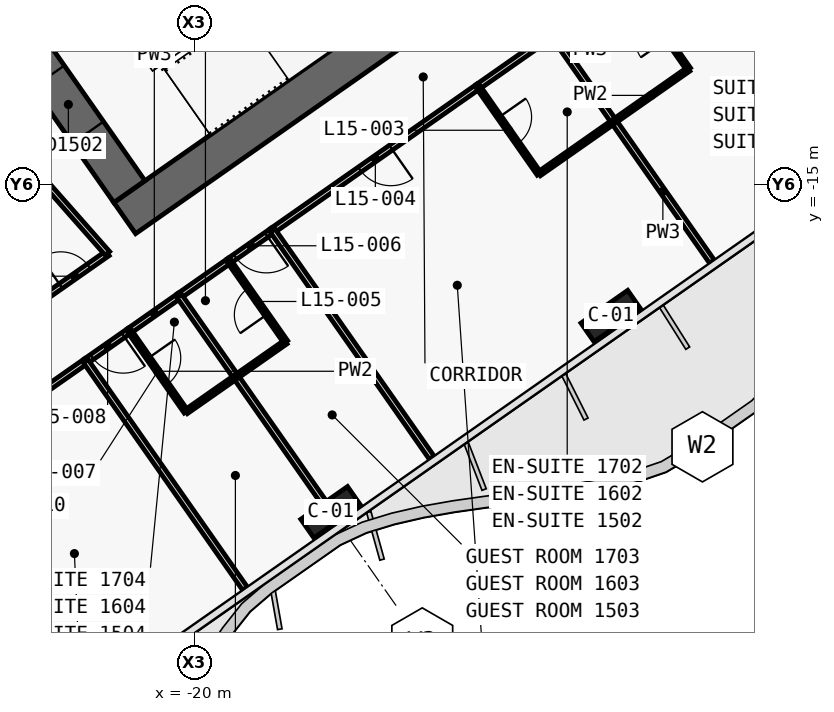
"""IFC4 building model, lengths in metres.
Left out: names, types, materials, properties, quantities, classifications, styles, units other than length and angle.
Written with IfcOpenShell. Run it as: python <this file> out.ifc"""

import sys

from ifc_helpers import new_model, si_unit, direction, frame, frame_2d, origin, origin_2d, place, context, subcontext, project, spatial, polyline, rectangle, outline, extrude, element, fill, save


model = new_model("IFC4")
c1 = context("Model", 3, precision=1e-05, world=origin(), true_north=direction((0.0, 1.0)))
c2 = subcontext(c1, "Body", "Model", "MODEL_VIEW")
j1 = project(units=[si_unit("LENGTHUNIT", "METRE"), si_unit("PLANEANGLEUNIT", "RADIAN")], contexts=[c1])
p1 = place(None, origin())
s1 = spatial("IfcSite", under=j1, at=p1, CompositionType="ELEMENT")
p2 = place(p1, origin())
s2 = spatial("IfcBuilding", under=s1, at=p2, CompositionType="ELEMENT")
p3 = place(p2, frame((0.0, 0.0, 79.7)))
s3 = spatial("IfcBuildingStorey", under=s2, at=p3, CompositionType="ELEMENT", Elevation=79.7)
p4 = place(p3, frame((0.037, -0.585, 0.0), z_axis=(0.0, 0.0, 1.0), x_axis=(-0.819157152511, -0.573569140985, 0.0)))
e1 = element("IfcWall", 1, at=p4, inside=s3, PredefinedType="SHEAR", context=c2, shape_type="SweptSolid", body=[
    extrude(outline(polyline([(26.695, 0.5), (0.7, 0.5), (0.0, -0.5), (26.695, -0.5), (26.695, 0.5)])), origin(), (0.0, 0.0, 1.0), 3.6),
])
p5 = place(p4, frame((2.995, 0.0, 0.0)))
e2 = element("IfcOpeningElement", 2, at=p5, cuts=e1, PredefinedType="OPENING", context=c2, shape_type="SweptSolid", body=[
    extrude(rectangle(XDim=2.4, YDim=2.1, at=frame_2d((1.2, 1.05))), frame((0.0, 0.51, 0.0), z_axis=(0.0, -1.0, 0.0), x_axis=(1.0, 0.0, 0.0)), (0.0, 0.0, 1.0), 1.02),
])
p6 = place(p4, frame((11.995, 0.0, 0.0)))
e3 = element("IfcOpeningElement", 3, at=p6, cuts=e1, PredefinedType="OPENING", context=c2, shape_type="SweptSolid", body=[
    extrude(rectangle(XDim=2.4, YDim=2.1, at=frame_2d((1.2, 1.05))), frame((0.0, 0.51, 0.0), z_axis=(0.0, -1.0, 0.0), x_axis=(1.0, 0.0, 0.0)), (0.0, 0.0, 1.0), 1.02),
])
p7 = place(p3, frame((-21.708, -15.2, 0.0), z_axis=(0.0, 0.0, 1.0), x_axis=(-0.573576324356, 0.819152122709, 0.0)))
e4 = element("IfcWall", 4, at=p7, inside=s3, PredefinedType="SHEAR", context=c2, shape_type="SweptSolid", body=[
    extrude(outline(polyline([(0.0, 0.5), (0.0, -0.5), (9.2, -0.5), (9.2, 0.5), (0.0, 0.5)])), origin(), (0.0, 0.0, 1.0), 3.6),
])
p8 = place(p7, frame((6.1, 0.0, 0.0)))
e5 = element("IfcOpeningElement", 5, at=p8, cuts=e4, PredefinedType="OPENING", context=c2, shape_type="SweptSolid", body=[
    extrude(rectangle(XDim=1.8, YDim=2.1, at=frame_2d((0.9, 1.05))), frame((0.0, 0.51, 0.0), z_axis=(0.0, -1.0, 0.0), x_axis=(1.0, 0.0, 0.0)), (0.0, 0.0, 1.0), 1.02),
])
p9 = place(p7, frame((1.9, 0.0, 0.0)))
e6 = element("IfcOpeningElement", 6, at=p9, cuts=e4, PredefinedType="OPENING", context=c2, shape_type="SweptSolid", body=[
    extrude(rectangle(XDim=1.8, YDim=2.1, at=frame_2d((0.9, 1.05))), frame((0.0, 0.51, 0.0), z_axis=(0.0, -1.0, 0.0), x_axis=(1.0, 0.0, 0.0)), (0.0, 0.0, 1.0), 1.02),
])
for number, where, z_axis, x_axis in (
    (7, (-9.038, -18.475, 0.0), (0.0, 0.0, 1.0), (-0.819, -0.574, 0.0)),
    (8, (-16.41, -23.637, 0.0), (0.0, 0.0, 1.0), (-0.819, -0.574, 0.0)),
):
    element("IfcColumn", number, at=place(p3, frame(where, z_axis=z_axis, x_axis=x_axis)), inside=s3, PredefinedType="COLUMN", context=c2, shape_type="SweptSolid", body=[
        extrude(rectangle(XDim=1.5, YDim=0.6, at=origin_2d()), origin(), (0.0, 0.0, 1.0), 3.6),
    ])
p10 = place(p3, frame((-24.003, -18.028, 0.0), z_axis=(0.0, 0.0, 1.0), x_axis=(0.819160859995, 0.573563846013, 0.0)))
e9 = element("IfcWall", 9, at=p10, inside=s3, PredefinedType="PARTITIONING", context=c2, shape_type="SweptSolid", body=[
    extrude(rectangle(XDim=2.098, YDim=0.15, at=frame_2d((1.049, 0.0))), origin(), (0.0, 0.0, 1.0), 3.32),
])
p11 = place(p10, frame((0.599, 0.0, 0.0)))
e10 = element("IfcOpeningElement", 10, at=p11, cuts=e9, PredefinedType="OPENING", context=c2, shape_type="SweptSolid", body=[
    extrude(rectangle(XDim=0.9, YDim=2.1, at=frame_2d((0.45, 1.05))), frame((0.0, 0.085, 0.0), z_axis=(0.0, -1.0, 0.0), x_axis=(1.0, 0.0, 0.0)), (0.0, 0.0, 1.0), 0.17),
])
p12 = place(p3, frame((-12.532, -12.437, 0.0), z_axis=(0.0, 0.0, 1.0), x_axis=(-0.819153746897, -0.573574004767, 0.0)))
e11 = element("IfcWall", 11, at=p12, inside=s3, PredefinedType="PARTITIONING", context=c2, shape_type="SweptSolid", body=[
    extrude(rectangle(XDim=6.603, YDim=0.15, at=frame_2d((3.302, 0.0))), origin(), (0.0, 0.0, 1.0), 2.6),
])
p13 = place(p12, frame((2.801, 0.0, 0.0)))
e12 = element("IfcOpeningElement", 12, at=p13, cuts=e11, PredefinedType="OPENING", context=c2, shape_type="SweptSolid", body=[
    extrude(rectangle(XDim=1.0, YDim=2.1, at=frame_2d((0.5, 1.05))), frame((0.0, 0.085, 0.0), z_axis=(0.0, -1.0, 0.0), x_axis=(1.0, 0.0, 0.0)), (0.0, 0.0, 1.0), 0.17),
])
p14 = place(p3, frame((-10.565, -11.06, 0.0), z_axis=(0.0, 0.0, 1.0), x_axis=(-0.819193748, -0.57351687267, 0.0)))
e13 = element("IfcWall", 13, at=p14, inside=s3, PredefinedType="PARTITIONING", context=c2, shape_type="SweptSolid", body=[
    extrude(rectangle(XDim=2.404, YDim=0.15, at=frame_2d((1.202, 0.0))), origin(), (0.0, 0.0, 1.0), 3.32),
])
p15 = place(p3, frame((-17.937, -16.222, 0.0), z_axis=(0.0, 0.0, 1.0), x_axis=(-0.819199220913, -0.573509055252, 0.0)))
e14 = element("IfcWall", 14, at=p15, inside=s3, PredefinedType="PARTITIONING", context=c2, shape_type="SweptSolid", body=[
    extrude(rectangle(XDim=1.403, YDim=0.15, at=frame_2d((0.702, 0.0))), origin(), (0.0, 0.0, 1.0), 3.32),
])
p16 = place(p15, frame((0.202, 0.0, 0.0)))
e15 = element("IfcOpeningElement", 15, at=p16, cuts=e14, PredefinedType="OPENING", context=c2, shape_type="SweptSolid", body=[
    extrude(rectangle(XDim=1.0, YDim=2.1, at=frame_2d((0.5, 1.05))), frame((0.0, 0.085, 0.0), z_axis=(0.0, -1.0, 0.0), x_axis=(1.0, 0.0, 0.0)), (0.0, 0.0, 1.0), 0.17),
])
p17 = place(p3, frame((-19.084, -17.025, 0.0), z_axis=(0.0, 0.0, 1.0), x_axis=(-0.819117502046, -0.573625764625, 0.0)))
e16 = element("IfcWall", 16, at=p17, inside=s3, PredefinedType="PARTITIONING", context=c2, shape_type="SweptSolid", body=[
    extrude(rectangle(XDim=1.604, YDim=0.15, at=frame_2d((0.802, 0.0))), origin(), (0.0, 0.0, 1.0), 2.6),
])
p18 = place(p3, frame((-21.706, -18.861, 0.0), z_axis=(0.0, 0.0, 1.0), x_axis=(-0.819060210533, -0.573707566205, 0.0)))
e17 = element("IfcWall", 17, at=p18, inside=s3, PredefinedType="PARTITIONING", context=c2, shape_type="SweptSolid", body=[
    extrude(rectangle(XDim=1.403, YDim=0.15, at=frame_2d((0.702, 0.0))), origin(), (0.0, 0.0, 1.0), 3.32),
])
p19 = place(p18, frame((0.201, 0.0, 0.0)))
e18 = element("IfcOpeningElement", 18, at=p19, cuts=e17, PredefinedType="OPENING", context=c2, shape_type="SweptSolid", body=[
    extrude(rectangle(XDim=1.0, YDim=2.1, at=frame_2d((0.5, 1.05))), frame((0.0, 0.085, 0.0), z_axis=(0.0, -1.0, 0.0), x_axis=(1.0, 0.0, 0.0)), (0.0, 0.0, 1.0), 0.17),
])
p20 = place(p3, frame((-20.395, -17.943, 0.0), z_axis=(0.0, 0.0, 1.0), x_axis=(-0.819189013667, -0.573523634986, 0.0)))
e19 = element("IfcWall", 19, at=p20, inside=s3, PredefinedType="PARTITIONING", context=c2, shape_type="SweptSolid", body=[
    extrude(rectangle(XDim=1.604, YDim=0.15, at=frame_2d((0.802, 0.0))), origin(), (0.0, 0.0, 1.0), 2.6),
])
p21 = place(p3, frame((-22.852, -19.664, 0.0), z_axis=(0.0, 0.0, 1.0), x_axis=(-0.819141582452, -0.573591377113, 0.0)))
e20 = element("IfcWall", 20, at=p21, inside=s3, PredefinedType="PARTITIONING", context=c2, shape_type="SweptSolid", body=[
    extrude(rectangle(XDim=6.603, YDim=0.15, at=frame_2d((3.301, 0.0))), origin(), (0.0, 0.0, 1.0), 2.6),
])
p22 = place(p21, frame((2.802, 0.0, 0.0)))
e21 = element("IfcOpeningElement", 21, at=p22, cuts=e20, PredefinedType="OPENING", context=c2, shape_type="SweptSolid", body=[
    extrude(rectangle(XDim=1.0, YDim=2.1, at=frame_2d((0.5, 1.05))), frame((0.0, 0.085, 0.0), z_axis=(0.0, -1.0, 0.0), x_axis=(1.0, 0.0, 0.0)), (0.0, 0.0, 1.0), 0.17),
])
p23 = place(p3, frame((-1.849, -13.051, 0.0), z_axis=(0.0, 0.0, 1.0), x_axis=(-0.573575988258, 0.819152358047, 0.0)))
e22 = element("IfcWall", 22, at=p23, inside=s3, PredefinedType="PARTITIONING", context=c2, shape_type="SweptSolid", body=[
    extrude(rectangle(XDim=6.632, YDim=0.15, at=frame_2d((3.316, 0.0))), origin(), (0.0, 0.0, 1.0), 2.6),
])
p24 = place(p3, frame((-22.284, -16.827, 0.0), z_axis=(0.0, 0.0, 1.0), x_axis=(-0.661545117561, 0.749905365651, 0.0)))
e23 = element("IfcWall", 23, at=p24, inside=s3, PredefinedType="PARTITIONING", context=c2, shape_type="SweptSolid", body=[
    extrude(rectangle(XDim=6.543, YDim=0.15, at=frame_2d((3.271, 0.0))), origin(), (0.0, 0.0, 1.0), 2.6),
])
p25 = place(p3, frame((-8.96, -13.355, 0.0), z_axis=(0.0, 0.0, 1.0), x_axis=(0.819188907105, 0.573523787192, 0.0)))
e24 = element("IfcWall", 24, at=p25, inside=s3, PredefinedType="PARTITIONING", context=c2, shape_type="SweptSolid", body=[
    extrude(rectangle(XDim=2.4, YDim=0.12, at=frame_2d((1.2, 0.0))), origin(), (0.0, 0.0, 1.0), 3.32),
])
p26 = place(p3, frame((-6.994, -11.978, 0.0), z_axis=(0.0, 0.0, 1.0), x_axis=(-0.573550118428, 0.819170471667, 0.0)))
e25 = element("IfcWall", 25, at=p26, inside=s3, PredefinedType="PARTITIONING", context=c2, shape_type="SweptSolid", body=[
    extrude(rectangle(XDim=2.8, YDim=0.12, at=frame_2d((1.4, 0.0))), origin(), (0.0, 0.0, 1.0), 3.32),
])
p27 = place(p26, frame((0.975, 0.0, 0.0)))
e26 = element("IfcOpeningElement", 26, at=p27, cuts=e25, PredefinedType="OPENING", context=c2, shape_type="SweptSolid", body=[
    extrude(rectangle(XDim=0.85, YDim=2.05, at=frame_2d((0.425, 1.025))), frame((0.0, 0.07, 0.0), z_axis=(0.0, -1.0, 0.0), x_axis=(1.0, 0.0, 0.0)), (0.0, 0.0, 1.0), 0.14),
])
p28 = place(p3, frame((-6.379, -17.041, 0.0), z_axis=(0.0, 0.0, 1.0), x_axis=(-0.573564311442, 0.819160534108, 0.0)))
e27 = element("IfcWall", 27, at=p28, inside=s3, PredefinedType="PARTITIONING", context=c2, shape_type="SweptSolid", body=[
    extrude(rectangle(XDim=4.499, YDim=0.15, at=frame_2d((2.25, 0.0))), origin(), (0.0, 0.0, 1.0), 2.5),
])
p29 = place(p3, frame((-8.96, -13.355, 0.0), z_axis=(0.0, 0.0, 1.0), x_axis=(-0.573608623498, 0.819129505664, 0.0)))
e28 = element("IfcWall", 28, at=p29, inside=s3, PredefinedType="PARTITIONING", context=c2, shape_type="SweptSolid", body=[
    extrude(rectangle(XDim=2.8, YDim=0.15, at=frame_2d((1.4, 0.0))), origin(), (0.0, 0.0, 1.0), 3.32),
])
p30 = place(p3, frame((-12.533, -12.438, 0.0), z_axis=(0.0, 0.0, 1.0), x_axis=(0.573550118428, -0.819170471667, 0.0)))
e29 = element("IfcWall", 29, at=p30, inside=s3, PredefinedType="PARTITIONING", context=c2, shape_type="SweptSolid", body=[
    extrude(rectangle(XDim=2.8, YDim=0.12, at=frame_2d((1.4, 0.0))), origin(), (0.0, 0.0, 1.0), 3.32),
])
p31 = place(p30, frame((0.975, 0.0, 0.0)))
e30 = element("IfcOpeningElement", 30, at=p31, cuts=e29, PredefinedType="OPENING", context=c2, shape_type="SweptSolid", body=[
    extrude(rectangle(XDim=0.85, YDim=2.05, at=frame_2d((0.425, 1.025))), frame((0.0, 0.07, 0.0), z_axis=(0.0, -1.0, 0.0), x_axis=(1.0, 0.0, 0.0)), (0.0, 0.0, 1.0), 0.14),
])
p32 = place(p3, frame((-10.926, -14.732, 0.0), z_axis=(0.0, 0.0, 1.0), x_axis=(0.819107643868, 0.573639841501, 0.0)))
e31 = element("IfcWall", 31, at=p32, inside=s3, PredefinedType="PARTITIONING", context=c2, shape_type="SweptSolid", body=[
    extrude(rectangle(XDim=2.4, YDim=0.12, at=frame_2d((1.2, 0.0))), origin(), (0.0, 0.0, 1.0), 3.32),
])
p33 = place(p3, frame((-13.752, -22.203, 0.0), z_axis=(0.0, 0.0, 1.0), x_axis=(-0.573594765376, 0.819139209862, 0.0)))
e32 = element("IfcWall", 32, at=p33, inside=s3, PredefinedType="PARTITIONING", context=c2, shape_type="SweptSolid", body=[
    extrude(rectangle(XDim=7.3, YDim=0.15, at=frame_2d((3.65, 0.0))), origin(), (0.0, 0.0, 1.0), 2.5),
])
p34 = place(p3, frame((-18.905, -20.075, 0.0), z_axis=(0.0, 0.0, 1.0), x_axis=(0.819131543282, 0.57360571371, 0.0)))
e33 = element("IfcWall", 33, at=p34, inside=s3, PredefinedType="PARTITIONING", context=c2, shape_type="SweptSolid", body=[
    extrude(rectangle(XDim=1.6, YDim=0.12, at=frame_2d((0.8, 0.0))), origin(), (0.0, 0.0, 1.0), 2.6),
])
p35 = place(p3, frame((-17.594, -19.156, 0.0), z_axis=(0.0, 0.0, 1.0), x_axis=(-0.573600972199, 0.819134863556, 0.0)))
e34 = element("IfcWall", 34, at=p35, inside=s3, PredefinedType="PARTITIONING", context=c2, shape_type="SweptSolid", body=[
    extrude(rectangle(XDim=2.6, YDim=0.12, at=frame_2d((1.3, 0.0))), origin(), (0.0, 0.0, 1.0), 3.32),
])
p36 = place(p35, frame((0.875, 0.0, 0.0)))
e35 = element("IfcOpeningElement", 35, at=p36, cuts=e34, PredefinedType="OPENING", context=c2, shape_type="SweptSolid", body=[
    extrude(rectangle(XDim=0.85, YDim=2.05, at=frame_2d((0.425, 1.025))), frame((0.0, 0.07, 0.0), z_axis=(0.0, -1.0, 0.0), x_axis=(1.0, 0.0, 0.0)), (0.0, 0.0, 1.0), 0.14),
])
p37 = place(p3, frame((-16.594, -23.375, 0.0), z_axis=(0.0, 0.0, 1.0), x_axis=(-0.573600608675, 0.819135118114, 0.0)))
e36 = element("IfcWall", 36, at=p37, inside=s3, PredefinedType="PARTITIONING", context=c2, shape_type="SweptSolid", body=[
    extrude(rectangle(XDim=4.029, YDim=0.15, at=frame_2d((2.015, 0.0))), origin(), (0.0, 0.0, 1.0), 2.6),
])
p38 = place(p3, frame((-18.905, -20.074, 0.0), z_axis=(0.0, 0.0, 1.0), x_axis=(-0.573645091666, 0.819103967032, 0.0)))
e37 = element("IfcWall", 37, at=p38, inside=s3, PredefinedType="PARTITIONING", context=c2, shape_type="SweptSolid", body=[
    extrude(rectangle(XDim=2.6, YDim=0.15, at=frame_2d((1.3, 0.0))), origin(), (0.0, 0.0, 1.0), 2.6),
])
p39 = place(p3, frame((-21.708, -18.862, 0.0), z_axis=(0.0, 0.0, 1.0), x_axis=(0.573537965655, -0.819178980414, 0.0)))
e38 = element("IfcWall", 38, at=p39, inside=s3, PredefinedType="PARTITIONING", context=c2, shape_type="SweptSolid", body=[
    extrude(rectangle(XDim=2.6, YDim=0.12, at=frame_2d((1.3, 0.0))), origin(), (0.0, 0.0, 1.0), 3.32),
])
p40 = place(p39, frame((0.875, 0.0, 0.0)))
e39 = element("IfcOpeningElement", 39, at=p40, cuts=e38, PredefinedType="OPENING", context=c2, shape_type="SweptSolid", body=[
    extrude(rectangle(XDim=0.85, YDim=2.05, at=frame_2d((0.425, 1.025))), frame((0.0, 0.07, 0.0), z_axis=(0.0, -1.0, 0.0), x_axis=(1.0, 0.0, 0.0)), (0.0, 0.0, 1.0), 0.14),
])
p41 = place(p3, frame((-20.215, -20.992, 0.0), z_axis=(0.0, 0.0, 1.0), x_axis=(0.819131543282, 0.57360571371, 0.0)))
e40 = element("IfcWall", 40, at=p41, inside=s3, PredefinedType="PARTITIONING", context=c2, shape_type="SweptSolid", body=[
    extrude(rectangle(XDim=1.6, YDim=0.12, at=frame_2d((0.8, 0.0))), origin(), (0.0, 0.0, 1.0), 2.6),
])
p42 = place(p3, frame((-18.667, -25.645, 0.0), z_axis=(0.0, 0.0, 1.0), x_axis=(-0.573572324301, 0.819154923562, 0.0)))
e41 = element("IfcWall", 41, at=p42, inside=s3, PredefinedType="PARTITIONING", context=c2, shape_type="SweptSolid", body=[
    extrude(rectangle(XDim=7.3, YDim=0.15, at=frame_2d((3.65, 0.0))), origin(), (0.0, 0.0, 1.0), 2.5),
])
p43 = place(p9, origin())
e42 = element("IfcDoor", 42, at=p43, inside=s3, OperationType="DOUBLE_DOOR_SINGLE_SWING", PredefinedType="DOOR", context=c2, shape_type="SweptSolid", body=[
    extrude(rectangle(XDim=1.8, YDim=2.1, at=frame_2d((0.9, 1.05))), frame((0.0, 0.025, 0.0), z_axis=(0.0, -1.0, 0.0), x_axis=(1.0, 0.0, 0.0)), (0.0, 0.0, 1.0), 0.05),
])
fill(e6, e42)
p44 = place(p31, origin())
e43 = element("IfcDoor", 43, at=p44, inside=s3, OperationType="SINGLE_SWING_LEFT", PredefinedType="DOOR", context=c2, shape_type="SweptSolid", body=[
    extrude(rectangle(XDim=0.85, YDim=2.05, at=frame_2d((0.425, 1.025))), frame((0.0, 0.025, 0.0), z_axis=(0.0, -1.0, 0.0), x_axis=(1.0, 0.0, 0.0)), (0.0, 0.0, 1.0), 0.05),
])
fill(e30, e43)
p45 = place(p13, origin())
e44 = element("IfcDoor", 44, at=p45, inside=s3, OperationType="SINGLE_SWING_LEFT", PredefinedType="DOOR", context=c2, shape_type="SweptSolid", body=[
    extrude(rectangle(XDim=1.0, YDim=2.1, at=frame_2d((0.5, 1.05))), frame((0.0, 0.025, 0.0), z_axis=(0.0, -1.0, 0.0), x_axis=(1.0, 0.0, 0.0)), (0.0, 0.0, 1.0), 0.05),
])
fill(e12, e44)
p46 = place(p36, origin())
e45 = element("IfcDoor", 45, at=p46, inside=s3, OperationType="SINGLE_SWING_RIGHT", PredefinedType="DOOR", context=c2, shape_type="SweptSolid", body=[
    extrude(rectangle(XDim=0.85, YDim=2.05, at=frame_2d((0.425, 1.025))), frame((0.0, 0.025, 0.0), z_axis=(0.0, -1.0, 0.0), x_axis=(1.0, 0.0, 0.0)), (0.0, 0.0, 1.0), 0.05),
])
fill(e35, e45)
p47 = place(p16, origin())
e46 = element("IfcDoor", 46, at=p47, inside=s3, OperationType="SINGLE_SWING_LEFT", PredefinedType="DOOR", context=c2, shape_type="SweptSolid", body=[
    extrude(rectangle(XDim=1.0, YDim=2.1, at=frame_2d((0.5, 1.05))), frame((0.0, 0.025, 0.0), z_axis=(0.0, -1.0, 0.0), x_axis=(1.0, 0.0, 0.0)), (0.0, 0.0, 1.0), 0.05),
])
fill(e15, e46)
p48 = place(p40, origin())
e47 = element("IfcDoor", 47, at=p48, inside=s3, OperationType="SINGLE_SWING_RIGHT", PredefinedType="DOOR", context=c2, shape_type="SweptSolid", body=[
    extrude(rectangle(XDim=0.85, YDim=2.05, at=frame_2d((0.425, 1.025))), frame((0.0, 0.025, 0.0), z_axis=(0.0, -1.0, 0.0), x_axis=(1.0, 0.0, 0.0)), (0.0, 0.0, 1.0), 0.05),
])
fill(e39, e47)
p49 = place(p19, origin())
e48 = element("IfcDoor", 48, at=p49, inside=s3, OperationType="SINGLE_SWING_LEFT", PredefinedType="DOOR", context=c2, shape_type="SweptSolid", body=[
    extrude(rectangle(XDim=1.0, YDim=2.1, at=frame_2d((0.5, 1.05))), frame((0.0, 0.025, 0.0), z_axis=(0.0, -1.0, 0.0), x_axis=(1.0, 0.0, 0.0)), (0.0, 0.0, 1.0), 0.05),
])
fill(e18, e48)
p50 = place(p11, origin())
e49 = element("IfcDoor", 49, at=p50, inside=s3, OperationType="SINGLE_SWING_LEFT", PredefinedType="DOOR", context=c2, shape_type="SweptSolid", body=[
    extrude(rectangle(XDim=0.9, YDim=2.1, at=frame_2d((0.45, 1.05))), frame((0.0, 0.025, 0.0), z_axis=(0.0, -1.0, 0.0), x_axis=(1.0, 0.0, 0.0)), (0.0, 0.0, 1.0), 0.05),
])
fill(e10, e49)
save(model, sys.argv[1])
